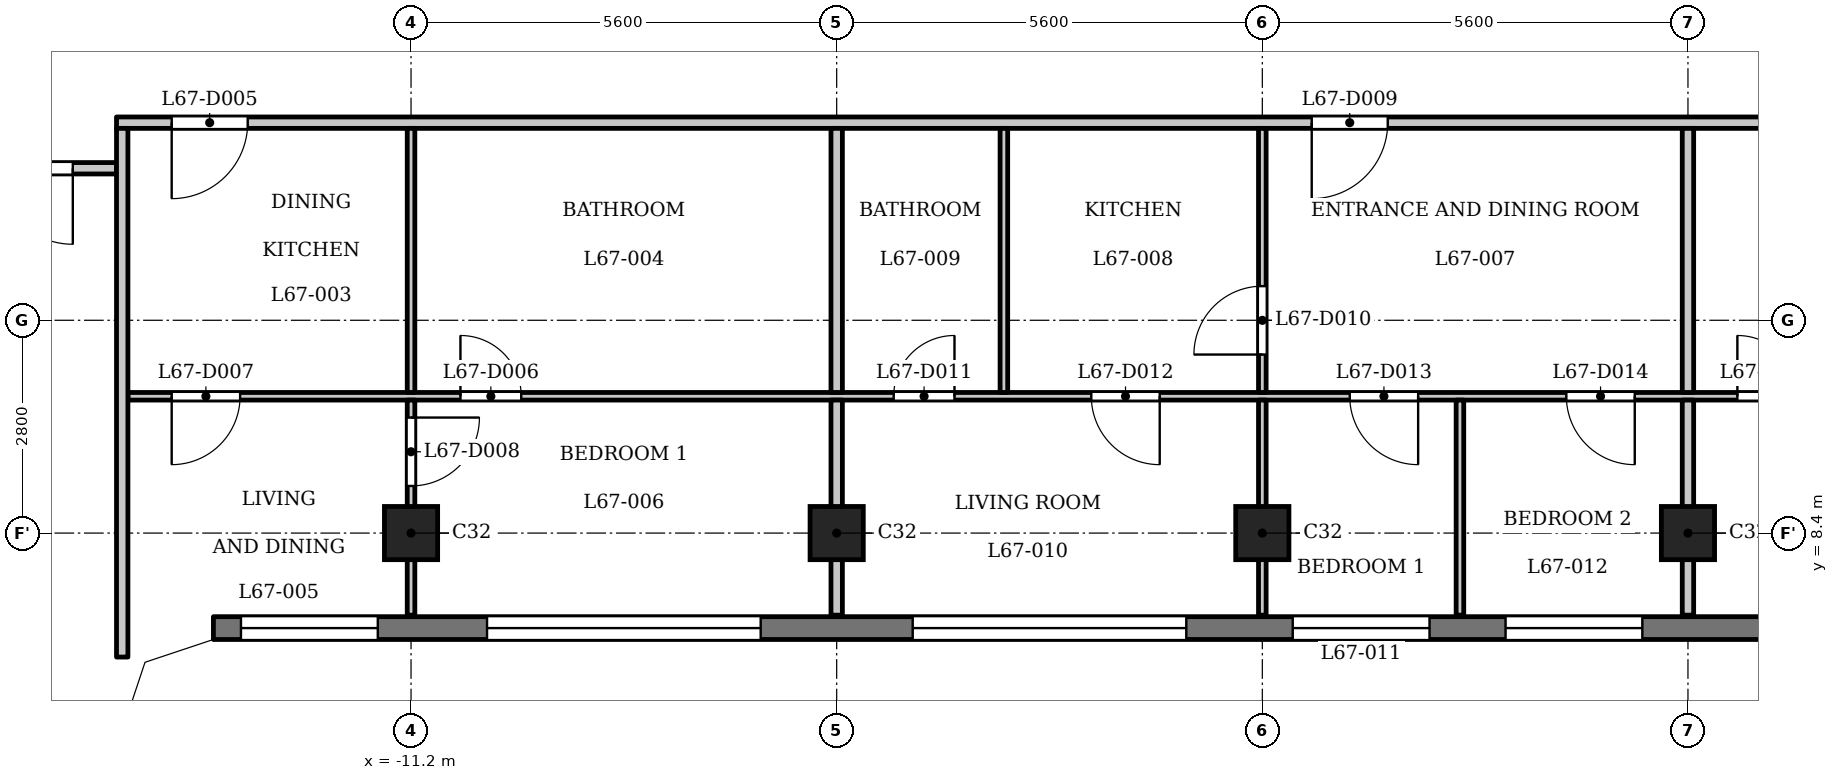
"""IFC4 building model, lengths in metres.
Left out: names, types, materials, properties, quantities, classifications, styles, units other than length and angle.
Written with IfcOpenShell. Run it as: python <this file> out.ifc"""

import sys

from ifc_helpers import new_model, si_unit, direction, frame, frame_2d, origin, origin_2d, place, context, subcontext, project, spatial, polyline, rectangle, outline, extrude, element, fill, save


model = new_model("IFC4")
c1 = context("Model", 3, precision=1e-05, world=origin(), true_north=direction((0.0, 1.0)))
c2 = subcontext(c1, "Body", "Model", "MODEL_VIEW")
j1 = project(units=[si_unit("LENGTHUNIT", "METRE"), si_unit("PLANEANGLEUNIT", "RADIAN")], contexts=[c1])
p1 = place(None, origin())
s1 = spatial("IfcSite", under=j1, at=p1, CompositionType="ELEMENT")
p2 = place(p1, origin())
s2 = spatial("IfcBuilding", under=s1, at=p2, CompositionType="ELEMENT")
p3 = place(p2, frame((0.0, 0.0, 259.2)))
s3 = spatial("IfcBuildingStorey", under=s2, at=p3, CompositionType="ELEMENT", Elevation=259.2)
for number, where, z_axis, x_axis in (
    (1, (-11.2, 8.4, 0.0), (0.0, 0.0, 1.0), (1.0, 0.0, 0.0)),
    (2, (-5.6, 8.4, 0.0), (0.0, 0.0, 1.0), (1.0, 0.0, 0.0)),
    (3, (0.0, 8.4, 0.0), (0.0, 0.0, 1.0), (1.0, 0.0, 0.0)),
    (4, (5.6, 8.4, 0.0), (0.0, 0.0, 1.0), (1.0, 0.0, 0.0)),
):
    element("IfcColumn", number, at=place(p3, frame(where, z_axis=z_axis, x_axis=x_axis)), inside=s3, PredefinedType="COLUMN", context=c2, shape_type="SweptSolid", body=[
        extrude(rectangle(XDim=0.7, YDim=0.7, at=origin_2d()), origin(), (0.0, 0.0, 1.0), 3.5),
    ])
p4 = place(p3, frame((-13.8, 7.15, 0.0), z_axis=(0.0, 0.0, 1.0), x_axis=(1.0, 0.0, 0.0)))
e5 = element("IfcWall", 5, at=p4, inside=s3, PredefinedType="SOLIDWALL", context=c2, shape_type="SweptSolid", body=[
    extrude(rectangle(XDim=27.6, YDim=0.3, at=frame_2d((13.8, 0.0))), origin(), (0.0, 0.0, 1.0), 3.2),
])
p5 = place(p4, frame((0.363, 0.0, 0.9)))
e6 = element("IfcOpeningElement", 6, at=p5, cuts=e5, PredefinedType="OPENING", context=c2, shape_type="SweptSolid", body=[
    extrude(rectangle(XDim=1.8, YDim=1.25, at=frame_2d((0.9, 0.625))), frame((0.0, 0.16, 0.0), z_axis=(0.0, -1.0, 0.0), x_axis=(1.0, 0.0, 0.0)), (0.0, 0.0, 1.0), 0.32),
])
p6 = place(p4, frame((3.6, 0.0, 1.2)))
e7 = element("IfcOpeningElement", 7, at=p6, cuts=e5, PredefinedType="OPENING", context=c2, shape_type="SweptSolid", body=[
    extrude(rectangle(XDim=3.6, YDim=0.95, at=frame_2d((1.8, 0.475))), frame((0.0, 0.16, 0.0), z_axis=(0.0, -1.0, 0.0), x_axis=(1.0, 0.0, 0.0)), (0.0, 0.0, 1.0), 0.32),
])
p7 = place(p4, frame((9.2, 0.0, 1.2)))
e8 = element("IfcOpeningElement", 8, at=p7, cuts=e5, PredefinedType="OPENING", context=c2, shape_type="SweptSolid", body=[
    extrude(rectangle(XDim=3.6, YDim=0.95, at=frame_2d((1.8, 0.475))), frame((0.0, 0.16, 0.0), z_axis=(0.0, -1.0, 0.0), x_axis=(1.0, 0.0, 0.0)), (0.0, 0.0, 1.0), 0.32),
])
p8 = place(p4, frame((14.2, 0.0, 0.9)))
e9 = element("IfcOpeningElement", 9, at=p8, cuts=e5, PredefinedType="OPENING", context=c2, shape_type="SweptSolid", body=[
    extrude(rectangle(XDim=1.8, YDim=1.25, at=frame_2d((0.9, 0.625))), frame((0.0, 0.16, 0.0), z_axis=(0.0, -1.0, 0.0), x_axis=(1.0, 0.0, 0.0)), (0.0, 0.0, 1.0), 0.32),
])
p9 = place(p4, frame((17.0, 0.0, 0.9)))
e10 = element("IfcOpeningElement", 10, at=p9, cuts=e5, PredefinedType="OPENING", context=c2, shape_type="SweptSolid", body=[
    extrude(rectangle(XDim=1.8, YDim=1.25, at=frame_2d((0.9, 0.625))), frame((0.0, 0.16, 0.0), z_axis=(0.0, -1.0, 0.0), x_axis=(1.0, 0.0, 0.0)), (0.0, 0.0, 1.0), 0.32),
])
p10 = place(p4, frame((20.4, 0.0, 1.2)))
e11 = element("IfcOpeningElement", 11, at=p10, cuts=e5, PredefinedType="OPENING", context=c2, shape_type="SweptSolid", body=[
    extrude(rectangle(XDim=3.6, YDim=0.95, at=frame_2d((1.8, 0.475))), frame((0.0, 0.16, 0.0), z_axis=(0.0, -1.0, 0.0), x_axis=(1.0, 0.0, 0.0)), (0.0, 0.0, 1.0), 0.32),
])
p11 = place(p4, frame((25.438, 0.0, 0.9)))
e12 = element("IfcOpeningElement", 12, at=p11, cuts=e5, PredefinedType="OPENING", context=c2, shape_type="SweptSolid", body=[
    extrude(rectangle(XDim=1.8, YDim=1.25, at=frame_2d((0.9, 0.625))), frame((0.0, 0.16, 0.0), z_axis=(0.0, -1.0, 0.0), x_axis=(1.0, 0.0, 0.0)), (0.0, 0.0, 1.0), 0.32),
])
p12 = place(p3, frame((-14.925, 10.2, 0.0), z_axis=(0.0, 0.0, 1.0), x_axis=(1.0, 0.0, 0.0)))
e13 = element("IfcWall", 13, at=p12, inside=s3, PredefinedType="PARTITIONING", context=c2, shape_type="SweptSolid", body=[
    extrude(rectangle(XDim=29.85, YDim=0.1, at=frame_2d((14.925, 0.0))), origin(), (0.0, 0.0, 1.0), 3.2),
])
p13 = place(p12, frame((4.375, 0.0, 0.0)))
e14 = element("IfcOpeningElement", 14, at=p13, cuts=e13, PredefinedType="OPENING", context=c2, shape_type="SweptSolid", body=[
    extrude(rectangle(XDim=0.8, YDim=2.1, at=frame_2d((0.4, 1.05))), frame((0.0, 0.06, 0.0), z_axis=(0.0, -1.0, 0.0), x_axis=(1.0, 0.0, 0.0)), (0.0, 0.0, 1.0), 0.12),
])
p14 = place(p12, frame((0.576, 0.0, 0.0)))
e15 = element("IfcOpeningElement", 15, at=p14, cuts=e13, PredefinedType="OPENING", context=c2, shape_type="SweptSolid", body=[
    extrude(rectangle(XDim=0.9, YDim=2.1, at=frame_2d((0.45, 1.05))), frame((0.0, 0.06, 0.0), z_axis=(0.0, -1.0, 0.0), x_axis=(1.0, 0.0, 0.0)), (0.0, 0.0, 1.0), 0.12),
])
p15 = place(p12, frame((10.075, 0.0, 0.0)))
e16 = element("IfcOpeningElement", 16, at=p15, cuts=e13, PredefinedType="OPENING", context=c2, shape_type="SweptSolid", body=[
    extrude(rectangle(XDim=0.8, YDim=2.1, at=frame_2d((0.4, 1.05))), frame((0.0, 0.06, 0.0), z_axis=(0.0, -1.0, 0.0), x_axis=(1.0, 0.0, 0.0)), (0.0, 0.0, 1.0), 0.12),
])
p16 = place(p12, frame((12.675, 0.0, 0.0)))
e17 = element("IfcOpeningElement", 17, at=p16, cuts=e13, PredefinedType="OPENING", context=c2, shape_type="SweptSolid", body=[
    extrude(rectangle(XDim=0.9, YDim=2.1, at=frame_2d((0.45, 1.05))), frame((0.0, 0.06, 0.0), z_axis=(0.0, -1.0, 0.0), x_axis=(1.0, 0.0, 0.0)), (0.0, 0.0, 1.0), 0.12),
])
p17 = place(p12, frame((16.075, 0.0, 0.0)))
e18 = element("IfcOpeningElement", 18, at=p17, cuts=e13, PredefinedType="OPENING", context=c2, shape_type="SweptSolid", body=[
    extrude(rectangle(XDim=0.9, YDim=2.1, at=frame_2d((0.45, 1.05))), frame((0.0, 0.06, 0.0), z_axis=(0.0, -1.0, 0.0), x_axis=(1.0, 0.0, 0.0)), (0.0, 0.0, 1.0), 0.12),
])
p18 = place(p12, frame((18.925, 0.0, 0.0)))
e19 = element("IfcOpeningElement", 19, at=p18, cuts=e13, PredefinedType="OPENING", context=c2, shape_type="SweptSolid", body=[
    extrude(rectangle(XDim=0.9, YDim=2.1, at=frame_2d((0.45, 1.05))), frame((0.0, 0.06, 0.0), z_axis=(0.0, -1.0, 0.0), x_axis=(1.0, 0.0, 0.0)), (0.0, 0.0, 1.0), 0.12),
])
p19 = place(p12, frame((21.175, 0.0, 0.0)))
e20 = element("IfcOpeningElement", 20, at=p19, cuts=e13, PredefinedType="OPENING", context=c2, shape_type="SweptSolid", body=[
    extrude(rectangle(XDim=0.8, YDim=2.1, at=frame_2d((0.4, 1.05))), frame((0.0, 0.06, 0.0), z_axis=(0.0, -1.0, 0.0), x_axis=(1.0, 0.0, 0.0)), (0.0, 0.0, 1.0), 0.12),
])
p20 = place(p12, frame((26.775, 0.0, 0.0)))
e21 = element("IfcOpeningElement", 21, at=p20, cuts=e13, PredefinedType="OPENING", context=c2, shape_type="SweptSolid", body=[
    extrude(rectangle(XDim=0.9, YDim=2.1, at=frame_2d((0.45, 1.05))), frame((0.0, 0.06, 0.0), z_axis=(0.0, -1.0, 0.0), x_axis=(1.0, 0.0, 0.0)), (0.0, 0.0, 1.0), 0.12),
])
p21 = place(p3, frame((-17.4, 13.2, 0.0), z_axis=(0.0, 0.0, 1.0), x_axis=(1.0, 0.0, 0.0)))
e22 = element("IfcWall", 22, at=p21, inside=s3, PredefinedType="PARTITIONING", context=c2, shape_type="SweptSolid", body=[
    extrude(rectangle(XDim=2.325, YDim=0.15, at=frame_2d((1.163, 0.0))), origin(), (0.0, 0.0, 1.0), 3.2),
])
p22 = place(p21, frame((0.75, 0.0, 0.0)))
e23 = element("IfcOpeningElement", 23, at=p22, cuts=e22, PredefinedType="OPENING", context=c2, shape_type="SweptSolid", body=[
    extrude(rectangle(XDim=1.0, YDim=2.1, at=frame_2d((0.5, 1.05))), frame((0.0, 0.085, 0.0), z_axis=(0.0, -1.0, 0.0), x_axis=(1.0, 0.0, 0.0)), (0.0, 0.0, 1.0), 0.17),
])
p23 = place(p3, frame((-15.075, 13.8, 0.0), z_axis=(0.0, 0.0, 1.0), x_axis=(1.0, 0.0, 0.0)))
e24 = element("IfcWall", 24, at=p23, inside=s3, PredefinedType="PARTITIONING", context=c2, shape_type="SweptSolid", body=[
    extrude(rectangle(XDim=30.15, YDim=0.15, at=frame_2d((15.075, 0.0))), origin(), (0.0, 0.0, 1.0), 3.2),
])
p24 = place(p23, frame((0.726, 0.0, 0.0)))
e25 = element("IfcOpeningElement", 25, at=p24, cuts=e24, PredefinedType="OPENING", context=c2, shape_type="SweptSolid", body=[
    extrude(rectangle(XDim=1.0, YDim=2.1, at=frame_2d((0.5, 1.05))), frame((0.0, 0.085, 0.0), z_axis=(0.0, -1.0, 0.0), x_axis=(1.0, 0.0, 0.0)), (0.0, 0.0, 1.0), 0.17),
])
p25 = place(p23, frame((15.725, 0.0, 0.0)))
e26 = element("IfcOpeningElement", 26, at=p25, cuts=e24, PredefinedType="OPENING", context=c2, shape_type="SweptSolid", body=[
    extrude(rectangle(XDim=1.0, YDim=2.1, at=frame_2d((0.5, 1.05))), frame((0.0, 0.085, 0.0), z_axis=(0.0, -1.0, 0.0), x_axis=(1.0, 0.0, 0.0)), (0.0, 0.0, 1.0), 0.17),
])
p26 = place(p23, frame((26.925, 0.0, 0.0)))
e27 = element("IfcOpeningElement", 27, at=p26, cuts=e24, PredefinedType="OPENING", context=c2, shape_type="SweptSolid", body=[
    extrude(rectangle(XDim=1.0, YDim=2.1, at=frame_2d((0.5, 1.05))), frame((0.0, 0.085, 0.0), z_axis=(0.0, -1.0, 0.0), x_axis=(1.0, 0.0, 0.0)), (0.0, 0.0, 1.0), 0.17),
])
p27 = place(p3, frame((-15.0, 6.769, 0.0), z_axis=(0.0, 0.0, 1.0), x_axis=(0.0, 1.0, 0.0)))
e28 = element("IfcWall", 28, at=p27, inside=s3, PredefinedType="PARTITIONING", context=c2, shape_type="SweptSolid", body=[
    extrude(rectangle(XDim=6.956, YDim=0.15, at=frame_2d((3.478, 0.0))), origin(), (0.0, 0.0, 1.0), 3.2),
])
p28 = place(p3, frame((-11.2, 7.32, 0.0), z_axis=(0.0, 0.0, 1.0), x_axis=(0.0, 1.0, 0.0)))
e29 = element("IfcWall", 29, at=p28, inside=s3, PredefinedType="PARTITIONING", context=c2, shape_type="SweptSolid", body=[
    extrude(rectangle(XDim=2.83, YDim=0.1, at=frame_2d((1.415, 0.0))), origin(), (0.0, 0.0, 1.0), 3.2),
])
p29 = place(p28, frame((1.7, 0.0, 0.0)))
e30 = element("IfcOpeningElement", 30, at=p29, cuts=e29, PredefinedType="OPENING", context=c2, shape_type="SweptSolid", body=[
    extrude(rectangle(XDim=0.9, YDim=2.1, at=frame_2d((0.45, 1.05))), frame((0.0, 0.06, 0.0), z_axis=(0.0, -1.0, 0.0), x_axis=(1.0, 0.0, 0.0)), (0.0, 0.0, 1.0), 0.12),
])
p30 = place(p3, frame((-11.2, 10.25, 0.0), z_axis=(0.0, 0.0, 1.0), x_axis=(0.0, 1.0, 0.0)))
e31 = element("IfcWall", 31, at=p30, inside=s3, PredefinedType="PARTITIONING", context=c2, shape_type="SweptSolid", body=[
    extrude(rectangle(XDim=3.475, YDim=0.1, at=frame_2d((1.738, 0.0))), origin(), (0.0, 0.0, 1.0), 3.2),
])
p31 = place(p3, frame((-5.6, 7.32, 0.0), z_axis=(0.0, 0.0, 1.0), x_axis=(0.0, 1.0, 0.0)))
e32 = element("IfcWall", 32, at=p31, inside=s3, PredefinedType="PARTITIONING", context=c2, shape_type="SweptSolid", body=[
    extrude(rectangle(XDim=2.83, YDim=0.15, at=frame_2d((1.415, 0.0))), origin(), (0.0, 0.0, 1.0), 3.2),
])
p32 = place(p3, frame((-5.6, 10.25, 0.0), z_axis=(0.0, 0.0, 1.0), x_axis=(0.0, 1.0, 0.0)))
e33 = element("IfcWall", 33, at=p32, inside=s3, PredefinedType="PARTITIONING", context=c2, shape_type="SweptSolid", body=[
    extrude(rectangle(XDim=3.475, YDim=0.15, at=frame_2d((1.738, 0.0))), origin(), (0.0, 0.0, 1.0), 3.2),
])
p33 = place(p3, frame((-3.4, 10.25, 0.0), z_axis=(0.0, 0.0, 1.0), x_axis=(0.0, 1.0, 0.0)))
e34 = element("IfcWall", 34, at=p33, inside=s3, PredefinedType="PARTITIONING", context=c2, shape_type="SweptSolid", body=[
    extrude(rectangle(XDim=3.475, YDim=0.1, at=frame_2d((1.738, 0.0))), origin(), (0.0, 0.0, 1.0), 3.2),
])
p34 = place(p3, frame((0.0, 7.32, 0.0), z_axis=(0.0, 0.0, 1.0), x_axis=(0.0, 1.0, 0.0)))
e35 = element("IfcWall", 35, at=p34, inside=s3, PredefinedType="PARTITIONING", context=c2, shape_type="SweptSolid", body=[
    extrude(rectangle(XDim=2.83, YDim=0.1, at=frame_2d((1.415, 0.0))), origin(), (0.0, 0.0, 1.0), 3.2),
])
p35 = place(p3, frame((0.0, 10.25, 0.0), z_axis=(0.0, 0.0, 1.0), x_axis=(0.0, 1.0, 0.0)))
e36 = element("IfcWall", 36, at=p35, inside=s3, PredefinedType="PARTITIONING", context=c2, shape_type="SweptSolid", body=[
    extrude(rectangle(XDim=3.475, YDim=0.1, at=frame_2d((1.738, 0.0))), origin(), (0.0, 0.0, 1.0), 3.2),
])
p36 = place(p35, frame((0.499, 0.0, 0.0)))
e37 = element("IfcOpeningElement", 37, at=p36, cuts=e36, PredefinedType="OPENING", context=c2, shape_type="SweptSolid", body=[
    extrude(rectangle(XDim=0.9, YDim=2.1, at=frame_2d((0.45, 1.05))), frame((0.0, 0.06, 0.0), z_axis=(0.0, -1.0, 0.0), x_axis=(1.0, 0.0, 0.0)), (0.0, 0.0, 1.0), 0.12),
])
p37 = place(p3, frame((2.6, 7.32, 0.0), z_axis=(0.0, 0.0, 1.0), x_axis=(0.0, 1.0, 0.0)))
e38 = element("IfcWall", 38, at=p37, inside=s3, PredefinedType="PARTITIONING", context=c2, shape_type="SweptSolid", body=[
    extrude(rectangle(XDim=2.83, YDim=0.1, at=frame_2d((1.415, 0.0))), origin(), (0.0, 0.0, 1.0), 3.2),
])
p38 = place(p3, frame((5.6, 7.32, 0.0), z_axis=(0.0, 0.0, 1.0), x_axis=(0.0, 1.0, 0.0)))
e39 = element("IfcWall", 39, at=p38, inside=s3, PredefinedType="PARTITIONING", context=c2, shape_type="SweptSolid", body=[
    extrude(rectangle(XDim=2.83, YDim=0.15, at=frame_2d((1.415, 0.0))), origin(), (0.0, 0.0, 1.0), 3.2),
])
p39 = place(p3, frame((5.6, 10.25, 0.0), z_axis=(0.0, 0.0, 1.0), x_axis=(0.0, 1.0, 0.0)))
e40 = element("IfcWall", 40, at=p39, inside=s3, PredefinedType="PARTITIONING", context=c2, shape_type="SweptSolid", body=[
    extrude(rectangle(XDim=3.475, YDim=0.15, at=frame_2d((1.738, 0.0))), origin(), (0.0, 0.0, 1.0), 3.2),
])
p40 = place(p3, origin())
e41 = element("IfcWall", 41, at=p40, inside=s3, PredefinedType="SOLIDWALL", context=c2, shape_type="SweptSolid", body=[
    extrude(outline(polyline([(-13.849, 7.3), (-14.937, 6.937), (-15.3, 5.849), (-15.3, 5.8), (-15.0, 5.8), (-14.7, 6.7), (-13.8, 7.0), (-13.8, 7.3), (-13.849, 7.3)])), origin(), (0.0, 0.0, 1.0), 3.2),
])
p41 = place(p22, origin())
e42 = element("IfcDoor", 42, at=p41, inside=s3, OperationType="SINGLE_SWING_RIGHT", PredefinedType="DOOR", context=c2, shape_type="SweptSolid", body=[
    extrude(rectangle(XDim=1.0, YDim=2.1, at=frame_2d((0.5, 1.05))), frame((0.0, 0.025, 0.0), z_axis=(0.0, -1.0, 0.0), x_axis=(1.0, 0.0, 0.0)), (0.0, 0.0, 1.0), 0.05),
])
fill(e23, e42)
p42 = place(p24, origin())
e43 = element("IfcDoor", 43, at=p42, inside=s3, OperationType="SINGLE_SWING_LEFT", PredefinedType="DOOR", context=c2, shape_type="SweptSolid", body=[
    extrude(rectangle(XDim=1.0, YDim=2.1, at=frame_2d((0.5, 1.05))), frame((0.0, 0.025, 0.0), z_axis=(0.0, -1.0, 0.0), x_axis=(1.0, 0.0, 0.0)), (0.0, 0.0, 1.0), 0.05),
])
fill(e25, e43)
p43 = place(p13, origin())
e44 = element("IfcDoor", 44, at=p43, inside=s3, OperationType="SINGLE_SWING_RIGHT", PredefinedType="DOOR", context=c2, shape_type="SweptSolid", body=[
    extrude(rectangle(XDim=0.8, YDim=2.1, at=frame_2d((0.4, 1.05))), frame((0.0, 0.025, 0.0), z_axis=(0.0, -1.0, 0.0), x_axis=(1.0, 0.0, 0.0)), (0.0, 0.0, 1.0), 0.05),
])
fill(e14, e44)
p44 = place(p14, origin())
e45 = element("IfcDoor", 45, at=p44, inside=s3, OperationType="SINGLE_SWING_LEFT", PredefinedType="DOOR", context=c2, shape_type="SweptSolid", body=[
    extrude(rectangle(XDim=0.9, YDim=2.1, at=frame_2d((0.45, 1.05))), frame((0.0, 0.025, 0.0), z_axis=(0.0, -1.0, 0.0), x_axis=(1.0, 0.0, 0.0)), (0.0, 0.0, 1.0), 0.05),
])
fill(e15, e45)
p45 = place(p29, origin())
e46 = element("IfcDoor", 46, at=p45, inside=s3, OperationType="SINGLE_SWING_RIGHT", PredefinedType="DOOR", context=c2, shape_type="SweptSolid", body=[
    extrude(rectangle(XDim=0.9, YDim=2.1, at=frame_2d((0.45, 1.05))), frame((0.0, 0.025, 0.0), z_axis=(0.0, -1.0, 0.0), x_axis=(1.0, 0.0, 0.0)), (0.0, 0.0, 1.0), 0.05),
])
fill(e30, e46)
p46 = place(p25, origin())
e47 = element("IfcDoor", 47, at=p46, inside=s3, OperationType="SINGLE_SWING_LEFT", PredefinedType="DOOR", context=c2, shape_type="SweptSolid", body=[
    extrude(rectangle(XDim=1.0, YDim=2.1, at=frame_2d((0.5, 1.05))), frame((0.0, 0.025, 0.0), z_axis=(0.0, -1.0, 0.0), x_axis=(1.0, 0.0, 0.0)), (0.0, 0.0, 1.0), 0.05),
])
fill(e26, e47)
p47 = place(p36, origin())
e48 = element("IfcDoor", 48, at=p47, inside=s3, OperationType="SINGLE_SWING_RIGHT", PredefinedType="DOOR", context=c2, shape_type="SweptSolid", body=[
    extrude(rectangle(XDim=0.9, YDim=2.1, at=frame_2d((0.45, 1.05))), frame((0.0, 0.025, 0.0), z_axis=(0.0, -1.0, 0.0), x_axis=(1.0, 0.0, 0.0)), (0.0, 0.0, 1.0), 0.05),
])
fill(e37, e48)
p48 = place(p15, origin())
e49 = element("IfcDoor", 49, at=p48, inside=s3, OperationType="SINGLE_SWING_LEFT", PredefinedType="DOOR", context=c2, shape_type="SweptSolid", body=[
    extrude(rectangle(XDim=0.8, YDim=2.1, at=frame_2d((0.4, 1.05))), frame((0.0, 0.025, 0.0), z_axis=(0.0, -1.0, 0.0), x_axis=(1.0, 0.0, 0.0)), (0.0, 0.0, 1.0), 0.05),
])
fill(e16, e49)
p49 = place(p16, origin())
e50 = element("IfcDoor", 50, at=p49, inside=s3, OperationType="SINGLE_SWING_RIGHT", PredefinedType="DOOR", context=c2, shape_type="SweptSolid", body=[
    extrude(rectangle(XDim=0.9, YDim=2.1, at=frame_2d((0.45, 1.05))), frame((0.0, 0.025, 0.0), z_axis=(0.0, -1.0, 0.0), x_axis=(1.0, 0.0, 0.0)), (0.0, 0.0, 1.0), 0.05),
])
fill(e17, e50)
p50 = place(p17, origin())
e51 = element("IfcDoor", 51, at=p50, inside=s3, OperationType="SINGLE_SWING_RIGHT", PredefinedType="DOOR", context=c2, shape_type="SweptSolid", body=[
    extrude(rectangle(XDim=0.9, YDim=2.1, at=frame_2d((0.45, 1.05))), frame((0.0, 0.025, 0.0), z_axis=(0.0, -1.0, 0.0), x_axis=(1.0, 0.0, 0.0)), (0.0, 0.0, 1.0), 0.05),
])
fill(e18, e51)
p51 = place(p18, origin())
e52 = element("IfcDoor", 52, at=p51, inside=s3, OperationType="SINGLE_SWING_RIGHT", PredefinedType="DOOR", context=c2, shape_type="SweptSolid", body=[
    extrude(rectangle(XDim=0.9, YDim=2.1, at=frame_2d((0.45, 1.05))), frame((0.0, 0.025, 0.0), z_axis=(0.0, -1.0, 0.0), x_axis=(1.0, 0.0, 0.0)), (0.0, 0.0, 1.0), 0.05),
])
fill(e19, e52)
p52 = place(p19, origin())
e53 = element("IfcDoor", 53, at=p52, inside=s3, OperationType="SINGLE_SWING_RIGHT", PredefinedType="DOOR", context=c2, shape_type="SweptSolid", body=[
    extrude(rectangle(XDim=0.8, YDim=2.1, at=frame_2d((0.4, 1.05))), frame((0.0, 0.025, 0.0), z_axis=(0.0, -1.0, 0.0), x_axis=(1.0, 0.0, 0.0)), (0.0, 0.0, 1.0), 0.05),
])
fill(e20, e53)
p53 = place(p5, origin())
e54 = element("IfcWindow", 54, at=p53, inside=s3, PartitioningType="SINGLE_PANEL", PredefinedType="WINDOW", context=c2, shape_type="SweptSolid", body=[
    extrude(rectangle(XDim=1.8, YDim=1.25, at=frame_2d((0.9, 0.625))), frame((0.0, 0.03, 0.0), z_axis=(0.0, -1.0, 0.0), x_axis=(1.0, 0.0, 0.0)), (0.0, 0.0, 1.0), 0.06),
])
fill(e6, e54)
p54 = place(p6, origin())
e55 = element("IfcWindow", 55, at=p54, inside=s3, PartitioningType="SINGLE_PANEL", PredefinedType="WINDOW", context=c2, shape_type="SweptSolid", body=[
    extrude(rectangle(XDim=3.6, YDim=0.95, at=frame_2d((1.8, 0.475))), frame((0.0, 0.03, 0.0), z_axis=(0.0, -1.0, 0.0), x_axis=(1.0, 0.0, 0.0)), (0.0, 0.0, 1.0), 0.06),
])
fill(e7, e55)
p55 = place(p7, origin())
e56 = element("IfcWindow", 56, at=p55, inside=s3, PartitioningType="SINGLE_PANEL", PredefinedType="WINDOW", context=c2, shape_type="SweptSolid", body=[
    extrude(rectangle(XDim=3.6, YDim=0.95, at=frame_2d((1.8, 0.475))), frame((0.0, 0.03, 0.0), z_axis=(0.0, -1.0, 0.0), x_axis=(1.0, 0.0, 0.0)), (0.0, 0.0, 1.0), 0.06),
])
fill(e8, e56)
p56 = place(p8, origin())
e57 = element("IfcWindow", 57, at=p56, inside=s3, PartitioningType="SINGLE_PANEL", PredefinedType="WINDOW", context=c2, shape_type="SweptSolid", body=[
    extrude(rectangle(XDim=1.8, YDim=1.25, at=frame_2d((0.9, 0.625))), frame((0.0, 0.03, 0.0), z_axis=(0.0, -1.0, 0.0), x_axis=(1.0, 0.0, 0.0)), (0.0, 0.0, 1.0), 0.06),
])
fill(e9, e57)
p57 = place(p9, origin())
e58 = element("IfcWindow", 58, at=p57, inside=s3, PartitioningType="SINGLE_PANEL", PredefinedType="WINDOW", context=c2, shape_type="SweptSolid", body=[
    extrude(rectangle(XDim=1.8, YDim=1.25, at=frame_2d((0.9, 0.625))), frame((0.0, 0.03, 0.0), z_axis=(0.0, -1.0, 0.0), x_axis=(1.0, 0.0, 0.0)), (0.0, 0.0, 1.0), 0.06),
])
fill(e10, e58)
save(model, sys.argv[1])
